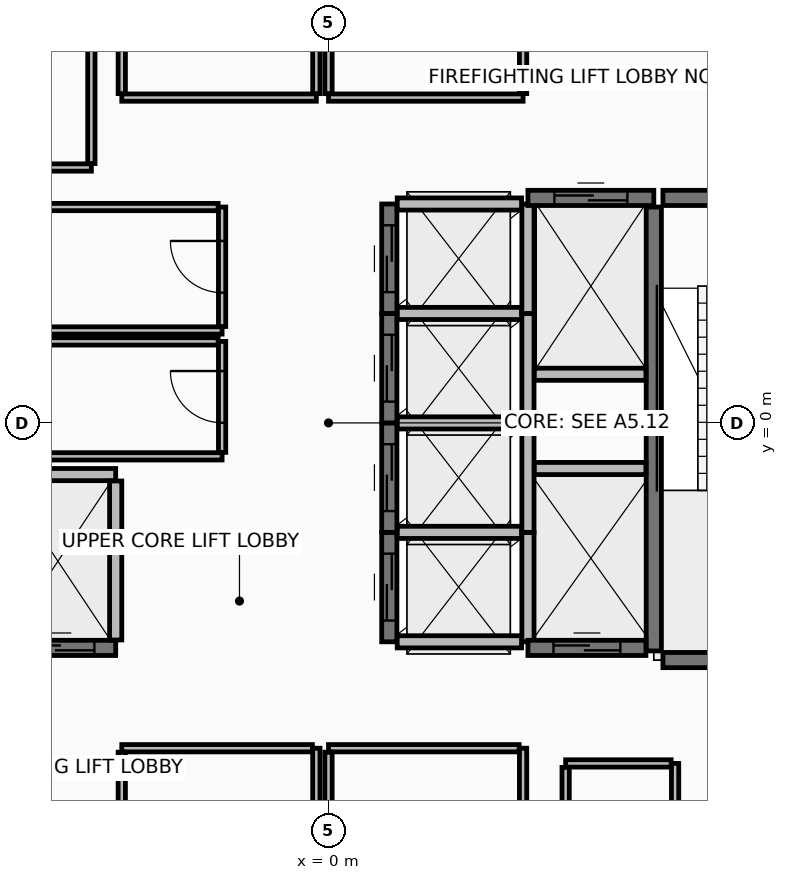
"""IFC4 building model, lengths in metres.
Left out: names, types, materials, properties, quantities, classifications, styles, units other than length and angle.
Written with IfcOpenShell. Run it as: python <this file> out.ifc"""

import sys

from ifc_helpers import new_model, si_unit, direction, frame, frame_2d, origin, place, context, subcontext, project, spatial, rectangle, extrude, element, fill, save


model = new_model("IFC4")
c1 = context("Model", 3, precision=1e-05, world=origin(), true_north=direction((0.0, 1.0)))
c2 = subcontext(c1, "Body", "Model", "MODEL_VIEW")
j1 = project(units=[si_unit("LENGTHUNIT", "METRE"), si_unit("PLANEANGLEUNIT", "RADIAN")], contexts=[c1])
p1 = place(None, origin())
s1 = spatial("IfcSite", under=j1, at=p1, CompositionType="ELEMENT")
p2 = place(p1, origin())
s2 = spatial("IfcBuilding", under=s1, at=p2, CompositionType="ELEMENT")
p3 = place(p2, frame((0.0, 0.0, 248.65)))
s3 = spatial("IfcBuildingStorey", under=s2, at=p3, CompositionType="ELEMENT", Elevation=248.65)
p4 = place(p3, frame((5.35, -3.75, 0.0), z_axis=(0.0, 0.0, 1.0), x_axis=(0.0, 1.0, 0.0)))
e1 = element("IfcWall", 1, at=p4, inside=s3, PredefinedType="SHEAR", context=c2, shape_type="SweptSolid", body=[
    extrude(rectangle(XDim=7.3, YDim=0.25, at=frame_2d((3.65, 0.0))), origin(), (0.0, 0.0, 1.0), 4.56),
])
p5 = place(p3, frame((5.5, 3.7, 0.0), z_axis=(0.0, 0.0, 1.0), x_axis=(1.0, 0.0, 0.0)))
e2 = element("IfcWall", 2, at=p5, inside=s3, PredefinedType="SHEAR", context=c2, shape_type="SweptSolid", body=[
    extrude(rectangle(XDim=3.0, YDim=0.25, at=frame_2d((1.5, 0.0))), origin(), (0.0, 0.0, 1.0), 4.56),
])
p6 = place(p5, frame((0.95, 0.0, 0.0)))
e3 = element("IfcOpeningElement", 3, at=p6, cuts=e2, PredefinedType="OPENING", context=c2, shape_type="SweptSolid", body=[
    extrude(rectangle(XDim=1.1, YDim=2.15, at=frame_2d((0.55, 1.075))), frame((0.0, 0.135, 0.0), z_axis=(0.0, -1.0, 0.0), x_axis=(1.0, 0.0, 0.0)), (0.0, 0.0, 1.0), 0.27),
])
p7 = place(p3, frame((5.5, -3.9, 0.0), z_axis=(0.0, 0.0, 1.0), x_axis=(1.0, 0.0, 0.0)))
e4 = element("IfcWall", 4, at=p7, inside=s3, PredefinedType="SHEAR", context=c2, shape_type="SweptSolid", body=[
    extrude(rectangle(XDim=3.0, YDim=0.25, at=frame_2d((1.5, 0.0))), origin(), (0.0, 0.0, 1.0), 4.56),
])
p8 = place(p3, frame((1.0, -3.6, 0.0), z_axis=(0.0, 0.0, 1.0), x_axis=(0.0, 1.0, 0.0)))
e5 = element("IfcWall", 5, at=p8, inside=s3, PredefinedType="SHEAR", context=c2, shape_type="SweptSolid", body=[
    extrude(rectangle(XDim=1.8, YDim=0.25, at=frame_2d((0.9, 0.0))), origin(), (0.0, 0.0, 1.0), 4.56),
])
p9 = place(p8, frame((0.35, 0.0, 0.0)))
e6 = element("IfcOpeningElement", 6, at=p9, cuts=e5, PredefinedType="OPENING", context=c2, shape_type="SweptSolid", body=[
    extrude(rectangle(XDim=1.1, YDim=2.2, at=frame_2d((0.55, 1.1))), frame((0.0, 0.135, 0.0), z_axis=(0.0, -1.0, 0.0), x_axis=(1.0, 0.0, 0.0)), (0.0, 0.0, 1.0), 0.27),
])
p10 = place(p3, frame((3.28, -3.6, 0.0), z_axis=(0.0, 0.0, 1.0), x_axis=(0.0, 1.0, 0.0)))
e7 = element("IfcWall", 7, at=p10, inside=s3, PredefinedType="PARTITIONING", context=c2, shape_type="SweptSolid", body=[
    extrude(rectangle(XDim=1.8, YDim=0.2, at=frame_2d((0.9, 0.0))), origin(), (0.0, 0.0, 1.0), 4.56),
])
for number, where, z_axis, x_axis in (
    (8, (1.13, -3.6, 0.0), (0.0, 0.0, 1.0), (1.0, 0.0, 0.0)),
    (9, (1.13, -1.8, 0.0), (0.0, 0.0, 1.0), (1.0, 0.0, 0.0)),
):
    element("IfcWall", number, at=place(p3, frame(where, z_axis=z_axis, x_axis=x_axis)), inside=s3, PredefinedType="PARTITIONING", context=c2, shape_type="SweptSolid", body=[
        extrude(rectangle(XDim=2.045, YDim=0.2, at=frame_2d((1.022, 0.0))), origin(), (0.0, 0.0, 1.0), 4.56),
    ])
p11 = place(p3, frame((1.0, -1.8, 0.0), z_axis=(0.0, 0.0, 1.0), x_axis=(0.0, 1.0, 0.0)))
e10 = element("IfcWall", 10, at=p11, inside=s3, PredefinedType="SHEAR", context=c2, shape_type="SweptSolid", body=[
    extrude(rectangle(XDim=1.8, YDim=0.25, at=frame_2d((0.9, 0.0))), origin(), (0.0, 0.0, 1.0), 4.56),
])
p12 = place(p11, frame((0.35, 0.0, 0.0)))
e11 = element("IfcOpeningElement", 11, at=p12, cuts=e10, PredefinedType="OPENING", context=c2, shape_type="SweptSolid", body=[
    extrude(rectangle(XDim=1.1, YDim=2.2, at=frame_2d((0.55, 1.1))), frame((0.0, 0.135, 0.0), z_axis=(0.0, -1.0, 0.0), x_axis=(1.0, 0.0, 0.0)), (0.0, 0.0, 1.0), 0.27),
])
p13 = place(p3, frame((3.28, -1.8, 0.0), z_axis=(0.0, 0.0, 1.0), x_axis=(0.0, 1.0, 0.0)))
e12 = element("IfcWall", 12, at=p13, inside=s3, PredefinedType="PARTITIONING", context=c2, shape_type="SweptSolid", body=[
    extrude(rectangle(XDim=1.8, YDim=0.2, at=frame_2d((0.9, 0.0))), origin(), (0.0, 0.0, 1.0), 4.56),
])
p14 = place(p3, frame((1.13, 0.0, 0.0), z_axis=(0.0, 0.0, 1.0), x_axis=(1.0, 0.0, 0.0)))
e13 = element("IfcWall", 13, at=p14, inside=s3, PredefinedType="PARTITIONING", context=c2, shape_type="SweptSolid", body=[
    extrude(rectangle(XDim=2.045, YDim=0.2, at=frame_2d((1.022, 0.0))), origin(), (0.0, 0.0, 1.0), 4.56),
])
p15 = place(p3, frame((1.0, 0.0, 0.0), z_axis=(0.0, 0.0, 1.0), x_axis=(0.0, 1.0, 0.0)))
e14 = element("IfcWall", 14, at=p15, inside=s3, PredefinedType="SHEAR", context=c2, shape_type="SweptSolid", body=[
    extrude(rectangle(XDim=1.8, YDim=0.25, at=frame_2d((0.9, 0.0))), origin(), (0.0, 0.0, 1.0), 4.56),
])
p16 = place(p15, frame((0.35, 0.0, 0.0)))
e15 = element("IfcOpeningElement", 15, at=p16, cuts=e14, PredefinedType="OPENING", context=c2, shape_type="SweptSolid", body=[
    extrude(rectangle(XDim=1.1, YDim=2.2, at=frame_2d((0.55, 1.1))), frame((0.0, 0.135, 0.0), z_axis=(0.0, -1.0, 0.0), x_axis=(1.0, 0.0, 0.0)), (0.0, 0.0, 1.0), 0.27),
])
p17 = place(p3, frame((3.28, 0.0, 0.0), z_axis=(0.0, 0.0, 1.0), x_axis=(0.0, 1.0, 0.0)))
e16 = element("IfcWall", 16, at=p17, inside=s3, PredefinedType="PARTITIONING", context=c2, shape_type="SweptSolid", body=[
    extrude(rectangle(XDim=1.8, YDim=0.2, at=frame_2d((0.9, 0.0))), origin(), (0.0, 0.0, 1.0), 4.56),
])
p18 = place(p3, frame((1.13, 1.8, 0.0), z_axis=(0.0, 0.0, 1.0), x_axis=(1.0, 0.0, 0.0)))
e17 = element("IfcWall", 17, at=p18, inside=s3, PredefinedType="PARTITIONING", context=c2, shape_type="SweptSolid", body=[
    extrude(rectangle(XDim=2.045, YDim=0.2, at=frame_2d((1.022, 0.0))), origin(), (0.0, 0.0, 1.0), 4.56),
])
p19 = place(p3, frame((1.0, 1.8, 0.0), z_axis=(0.0, 0.0, 1.0), x_axis=(0.0, 1.0, 0.0)))
e18 = element("IfcWall", 18, at=p19, inside=s3, PredefinedType="SHEAR", context=c2, shape_type="SweptSolid", body=[
    extrude(rectangle(XDim=1.8, YDim=0.25, at=frame_2d((0.9, 0.0))), origin(), (0.0, 0.0, 1.0), 4.56),
])
p20 = place(p19, frame((0.35, 0.0, 0.0)))
e19 = element("IfcOpeningElement", 19, at=p20, cuts=e18, PredefinedType="OPENING", context=c2, shape_type="SweptSolid", body=[
    extrude(rectangle(XDim=1.1, YDim=2.2, at=frame_2d((0.55, 1.1))), frame((0.0, 0.135, 0.0), z_axis=(0.0, -1.0, 0.0), x_axis=(1.0, 0.0, 0.0)), (0.0, 0.0, 1.0), 0.27),
])
p21 = place(p3, frame((3.28, 1.8, 0.0), z_axis=(0.0, 0.0, 1.0), x_axis=(0.0, 1.0, 0.0)))
e20 = element("IfcWall", 20, at=p21, inside=s3, PredefinedType="PARTITIONING", context=c2, shape_type="SweptSolid", body=[
    extrude(rectangle(XDim=1.8, YDim=0.2, at=frame_2d((0.9, 0.0))), origin(), (0.0, 0.0, 1.0), 4.56),
])
p22 = place(p3, frame((1.13, 3.6, 0.0), z_axis=(0.0, 0.0, 1.0), x_axis=(1.0, 0.0, 0.0)))
e21 = element("IfcWall", 21, at=p22, inside=s3, PredefinedType="PARTITIONING", context=c2, shape_type="SweptSolid", body=[
    extrude(rectangle(XDim=2.045, YDim=0.2, at=frame_2d((1.022, 0.0))), origin(), (0.0, 0.0, 1.0), 3.855),
])
p23 = place(p3, frame((-5.4, -3.7, 0.0), z_axis=(0.0, 0.0, 1.0), x_axis=(1.0, 0.0, 0.0)))
e22 = element("IfcWall", 22, at=p23, inside=s3, PredefinedType="SHEAR", context=c2, shape_type="SweptSolid", body=[
    extrude(rectangle(XDim=1.9, YDim=0.25, at=frame_2d((0.95, 0.0))), origin(), (0.0, 0.0, 1.0), 4.56),
])
p24 = place(p23, frame((0.35, 0.0, 0.0)))
e23 = element("IfcOpeningElement", 23, at=p24, cuts=e22, PredefinedType="OPENING", context=c2, shape_type="SweptSolid", body=[
    extrude(rectangle(XDim=1.2, YDim=2.2, at=frame_2d((0.6, 1.1))), frame((0.0, 0.135, 0.0), z_axis=(0.0, -1.0, 0.0), x_axis=(1.0, 0.0, 0.0)), (0.0, 0.0, 1.0), 0.27),
])
p25 = place(p3, frame((-5.27, -0.85, 0.0), z_axis=(0.0, 0.0, 1.0), x_axis=(1.0, 0.0, 0.0)))
e24 = element("IfcWall", 24, at=p25, inside=s3, PredefinedType="PARTITIONING", context=c2, shape_type="SweptSolid", body=[
    extrude(rectangle(XDim=1.77, YDim=0.2, at=frame_2d((0.885, 0.0))), origin(), (0.0, 0.0, 1.0), 4.56),
])
p26 = place(p3, frame((-3.5, -3.57, 0.0), z_axis=(0.0, 0.0, 1.0), x_axis=(0.0, 1.0, 0.0)))
e25 = element("IfcWall", 25, at=p26, inside=s3, PredefinedType="PARTITIONING", context=c2, shape_type="SweptSolid", body=[
    extrude(rectangle(XDim=2.615, YDim=0.2, at=frame_2d((1.308, 0.0))), origin(), (0.0, 0.0, 1.0), 4.56),
])
p27 = place(p3, frame((3.28, 3.7, 0.0), z_axis=(0.0, 0.0, 1.0), x_axis=(1.0, 0.0, 0.0)))
e26 = element("IfcWall", 26, at=p27, inside=s3, PredefinedType="SHEAR", context=c2, shape_type="SweptSolid", body=[
    extrude(rectangle(XDim=2.07, YDim=0.25, at=frame_2d((1.035, 0.0))), origin(), (0.0, 0.0, 1.0), 4.56),
])
p28 = place(p27, frame((0.435, 0.0, 0.0)))
e27 = element("IfcOpeningElement", 27, at=p28, cuts=e26, PredefinedType="OPENING", context=c2, shape_type="SweptSolid", body=[
    extrude(rectangle(XDim=1.2, YDim=2.2, at=frame_2d((0.6, 1.1))), frame((0.0, 0.135, 0.0), z_axis=(0.0, -1.0, 0.0), x_axis=(1.0, 0.0, 0.0)), (0.0, 0.0, 1.0), 0.27),
])
p29 = place(p3, frame((3.385, 0.8, 0.0), z_axis=(0.0, 0.0, 1.0), x_axis=(1.0, 0.0, 0.0)))
e28 = element("IfcWall", 28, at=p29, inside=s3, PredefinedType="PARTITIONING", context=c2, shape_type="SweptSolid", body=[
    extrude(rectangle(XDim=1.835, YDim=0.2, at=frame_2d((0.917, 0.0))), origin(), (0.0, 0.0, 1.0), 4.56),
])
p30 = place(p3, frame((3.28, -3.7, 0.0), z_axis=(0.0, 0.0, 1.0), x_axis=(1.0, 0.0, 0.0)))
e29 = element("IfcWall", 29, at=p30, inside=s3, PredefinedType="SHEAR", context=c2, shape_type="SweptSolid", body=[
    extrude(rectangle(XDim=1.94, YDim=0.25, at=frame_2d((0.97, 0.0))), origin(), (0.0, 0.0, 1.0), 4.56),
])
p31 = place(p30, frame((0.42, 0.0, 0.0)))
e30 = element("IfcOpeningElement", 30, at=p31, cuts=e29, PredefinedType="OPENING", context=c2, shape_type="SweptSolid", body=[
    extrude(rectangle(XDim=1.1, YDim=2.2, at=frame_2d((0.55, 1.1))), frame((0.0, 0.135, 0.0), z_axis=(0.0, -1.0, 0.0), x_axis=(1.0, 0.0, 0.0)), (0.0, 0.0, 1.0), 0.27),
])
p32 = place(p3, frame((3.385, -0.75, 0.0), z_axis=(0.0, 0.0, 1.0), x_axis=(1.0, 0.0, 0.0)))
e31 = element("IfcWall", 31, at=p32, inside=s3, PredefinedType="PARTITIONING", context=c2, shape_type="SweptSolid", body=[
    extrude(rectangle(XDim=1.835, YDim=0.2, at=frame_2d((0.917, 0.0))), origin(), (0.0, 0.0, 1.0), 4.56),
])
p33 = place(p3, frame((-5.22, 1.52, 0.0), z_axis=(0.0, 0.0, 1.0), x_axis=(1.0, 0.0, 0.0)))
e32 = element("IfcWall", 32, at=p33, inside=s3, PredefinedType="PARTITIONING", context=c2, shape_type="SweptSolid", body=[
    extrude(rectangle(XDim=3.47, YDim=0.12, at=frame_2d((1.735, 0.0))), origin(), (0.0, 0.0, 1.0), 4.56),
])
p34 = place(p3, frame((-1.75, 1.585, 0.0), z_axis=(0.0, 0.0, 1.0), x_axis=(0.0, 1.0, 0.0)))
e33 = element("IfcWall", 33, at=p34, inside=s3, PredefinedType="PARTITIONING", context=c2, shape_type="SweptSolid", body=[
    extrude(rectangle(XDim=1.965, YDim=0.12, at=frame_2d((0.982, 0.0))), origin(), (0.0, 0.0, 1.0), 4.56),
])
p35 = place(p34, frame((0.557, 0.0, 0.0)))
e34 = element("IfcOpeningElement", 34, at=p35, cuts=e33, PredefinedType="OPENING", context=c2, shape_type="SweptSolid", body=[
    extrude(rectangle(XDim=0.85, YDim=2.1, at=frame_2d((0.425, 1.05))), frame((0.0, 0.07, 0.0), z_axis=(0.0, -1.0, 0.0), x_axis=(1.0, 0.0, 0.0)), (0.0, 0.0, 1.0), 0.14),
])
p36 = place(p3, frame((-1.815, 3.55, 0.0), z_axis=(0.0, 0.0, 1.0), x_axis=(-1.0, 0.0, 0.0)))
e35 = element("IfcWall", 35, at=p36, inside=s3, PredefinedType="PARTITIONING", context=c2, shape_type="SweptSolid", body=[
    extrude(rectangle(XDim=3.405, YDim=0.12, at=frame_2d((1.703, 0.0))), origin(), (0.0, 0.0, 1.0), 4.56),
])
p37 = place(p3, frame((-5.22, -0.55, 0.0), z_axis=(0.0, 0.0, 1.0), x_axis=(1.0, 0.0, 0.0)))
e36 = element("IfcWall", 36, at=p37, inside=s3, PredefinedType="PARTITIONING", context=c2, shape_type="SweptSolid", body=[
    extrude(rectangle(XDim=3.47, YDim=0.12, at=frame_2d((1.735, 0.0))), origin(), (0.0, 0.0, 1.0), 4.56),
])
p38 = place(p3, frame((-1.75, -0.485, 0.0), z_axis=(0.0, 0.0, 1.0), x_axis=(0.0, 1.0, 0.0)))
e37 = element("IfcWall", 37, at=p38, inside=s3, PredefinedType="PARTITIONING", context=c2, shape_type="SweptSolid", body=[
    extrude(rectangle(XDim=1.825, YDim=0.12, at=frame_2d((0.913, 0.0))), origin(), (0.0, 0.0, 1.0), 4.56),
])
p39 = place(p38, frame((0.488, 0.0, 0.0)))
e38 = element("IfcOpeningElement", 38, at=p39, cuts=e37, PredefinedType="OPENING", context=c2, shape_type="SweptSolid", body=[
    extrude(rectangle(XDim=0.85, YDim=2.1, at=frame_2d((0.425, 1.05))), frame((0.0, 0.07, 0.0), z_axis=(0.0, -1.0, 0.0), x_axis=(1.0, 0.0, 0.0)), (0.0, 0.0, 1.0), 0.14),
])
p40 = place(p3, frame((-1.815, 1.34, 0.0), z_axis=(0.0, 0.0, 1.0), x_axis=(-1.0, 0.0, 0.0)))
e39 = element("IfcWall", 39, at=p40, inside=s3, PredefinedType="PARTITIONING", context=c2, shape_type="SweptSolid", body=[
    extrude(rectangle(XDim=3.405, YDim=0.12, at=frame_2d((1.703, 0.0))), origin(), (0.0, 0.0, 1.0), 4.56),
])
p41 = place(p3, frame((-0.2, -7.42, 0.0), z_axis=(0.0, 0.0, 1.0), x_axis=(0.0, 1.0, 0.0)))
e40 = element("IfcWall", 40, at=p41, inside=s3, PredefinedType="PARTITIONING", context=c2, shape_type="SweptSolid", body=[
    extrude(rectangle(XDim=2.07, YDim=0.12, at=frame_2d((1.035, 0.0))), origin(), (0.0, 0.0, 1.0), 3.855),
])
p42 = place(p3, frame((-0.265, -5.35, 0.0), z_axis=(0.0, 0.0, 1.0), x_axis=(-1.0, 0.0, 0.0)))
e41 = element("IfcWall", 41, at=p42, inside=s3, PredefinedType="PARTITIONING", context=c2, shape_type="SweptSolid", body=[
    extrude(rectangle(XDim=3.135, YDim=0.12, at=frame_2d((1.567, 0.0))), origin(), (0.0, 0.0, 1.0), 3.855),
])
p43 = place(p3, frame((-3.4, -5.415, 0.0), z_axis=(0.0, 0.0, 1.0), x_axis=(0.0, -1.0, 0.0)))
e42 = element("IfcWall", 42, at=p43, inside=s3, PredefinedType="PARTITIONING", context=c2, shape_type="SweptSolid", body=[
    extrude(rectangle(XDim=2.8, YDim=0.12, at=frame_2d((1.4, 0.0))), origin(), (0.0, 0.0, 1.0), 2.355),
])
p44 = place(p3, frame((3.2, -8.215, 0.0), z_axis=(0.0, 0.0, 1.0), x_axis=(0.0, 1.0, 0.0)))
e43 = element("IfcWall", 43, at=p44, inside=s3, PredefinedType="PARTITIONING", context=c2, shape_type="SweptSolid", body=[
    extrude(rectangle(XDim=2.865, YDim=0.12, at=frame_2d((1.433, 0.0))), origin(), (0.0, 0.0, 1.0), 3.855),
])
p45 = place(p3, frame((3.135, -5.35, 0.0), z_axis=(0.0, 0.0, 1.0), x_axis=(-1.0, 0.0, 0.0)))
e44 = element("IfcWall", 44, at=p45, inside=s3, PredefinedType="PARTITIONING", context=c2, shape_type="SweptSolid", body=[
    extrude(rectangle(XDim=3.135, YDim=0.12, at=frame_2d((1.567, 0.0))), origin(), (0.0, 0.0, 1.0), 4.56),
])
p46 = place(p3, frame((0.0, -5.415, 0.0), z_axis=(0.0, 0.0, 1.0), x_axis=(0.0, -1.0, 0.0)))
e45 = element("IfcWall", 45, at=p46, inside=s3, PredefinedType="PARTITIONING", context=c2, shape_type="SweptSolid", body=[
    extrude(rectangle(XDim=2.005, YDim=0.12, at=frame_2d((1.002, 0.0))), origin(), (0.0, 0.0, 1.0), 3.855),
])
p47 = place(p3, frame((-3.4, 5.35, 0.0), z_axis=(0.0, 0.0, 1.0), x_axis=(1.0, 0.0, 0.0)))
e46 = element("IfcWall", 46, at=p47, inside=s3, PredefinedType="PARTITIONING", context=c2, shape_type="SweptSolid", body=[
    extrude(rectangle(XDim=3.2, YDim=0.12, at=frame_2d((1.6, 0.0))), origin(), (0.0, 0.0, 1.0), 4.56),
])
p48 = place(p3, frame((-0.2, 5.415, 0.0), z_axis=(0.0, 0.0, 1.0), x_axis=(0.0, 1.0, 0.0)))
e47 = element("IfcWall", 47, at=p48, inside=s3, PredefinedType="PARTITIONING", context=c2, shape_type="SweptSolid", body=[
    extrude(rectangle(XDim=2.005, YDim=0.12, at=frame_2d((1.002, 0.0))), origin(), (0.0, 0.0, 1.0), 3.855),
])
p49 = place(p3, frame((-3.4, 8.215, 0.0), z_axis=(0.0, 0.0, 1.0), x_axis=(0.0, -1.0, 0.0)))
e48 = element("IfcWall", 48, at=p49, inside=s3, PredefinedType="PARTITIONING", context=c2, shape_type="SweptSolid", body=[
    extrude(rectangle(XDim=2.8, YDim=0.12, at=frame_2d((1.4, 0.0))), origin(), (0.0, 0.0, 1.0), 3.855),
])
p50 = place(p3, frame((0.0, 5.35, 0.0), z_axis=(0.0, 0.0, 1.0), x_axis=(1.0, 0.0, 0.0)))
e49 = element("IfcWall", 49, at=p50, inside=s3, PredefinedType="PARTITIONING", context=c2, shape_type="SweptSolid", body=[
    extrude(rectangle(XDim=3.2, YDim=0.12, at=frame_2d((1.6, 0.0))), origin(), (0.0, 0.0, 1.0), 3.855),
])
p51 = place(p3, frame((3.2, 5.415, 0.0), z_axis=(0.0, 0.0, 1.0), x_axis=(0.0, 1.0, 0.0)))
e50 = element("IfcWall", 50, at=p51, inside=s3, PredefinedType="PARTITIONING", context=c2, shape_type="SweptSolid", body=[
    extrude(rectangle(XDim=2.8, YDim=0.12, at=frame_2d((1.4, 0.0))), origin(), (0.0, 0.0, 1.0), 3.855),
])
p52 = place(p3, frame((0.0, 7.42, 0.0), z_axis=(0.0, 0.0, 1.0), x_axis=(0.0, -1.0, 0.0)))
e51 = element("IfcWall", 51, at=p52, inside=s3, PredefinedType="PARTITIONING", context=c2, shape_type="SweptSolid", body=[
    extrude(rectangle(XDim=2.005, YDim=0.12, at=frame_2d((1.002, 0.0))), origin(), (0.0, 0.0, 1.0), 3.855),
])
p53 = place(p3, frame((-6.35, 4.2, 0.0), z_axis=(0.0, 0.0, 1.0), x_axis=(1.0, 0.0, 0.0)))
e52 = element("IfcWall", 52, at=p53, inside=s3, PredefinedType="PARTITIONING", context=c2, shape_type="SweptSolid", body=[
    extrude(rectangle(XDim=2.45, YDim=0.12, at=frame_2d((1.225, 0.0))), origin(), (0.0, 0.0, 1.0), 4.56),
])
p54 = place(p3, frame((-3.9, 4.265, 0.0), z_axis=(0.0, 0.0, 1.0), x_axis=(0.0, 1.0, 0.0)))
e53 = element("IfcWall", 53, at=p54, inside=s3, PredefinedType="PARTITIONING", context=c2, shape_type="SweptSolid", body=[
    extrude(rectangle(XDim=3.95, YDim=0.12, at=frame_2d((1.975, 0.0))), origin(), (0.0, 0.0, 1.0), 3.855),
])
p55 = place(p3, frame((5.7, -8.215, 0.0), z_axis=(0.0, 0.0, 1.0), x_axis=(0.0, 1.0, 0.0)))
e54 = element("IfcWall", 54, at=p55, inside=s3, PredefinedType="PARTITIONING", context=c2, shape_type="SweptSolid", body=[
    extrude(rectangle(XDim=2.615, YDim=0.12, at=frame_2d((1.308, 0.0))), origin(), (0.0, 0.0, 1.0), 3.855),
])
p56 = place(p3, frame((5.635, -5.6, 0.0), z_axis=(0.0, 0.0, 1.0), x_axis=(-1.0, 0.0, 0.0)))
e55 = element("IfcWall", 55, at=p56, inside=s3, PredefinedType="PARTITIONING", context=c2, shape_type="SweptSolid", body=[
    extrude(rectangle(XDim=1.735, YDim=0.12, at=frame_2d((0.868, 0.0))), origin(), (0.0, 0.0, 1.0), 4.56),
])
p57 = place(p3, frame((3.9, -5.665, 0.0), z_axis=(0.0, 0.0, 1.0), x_axis=(0.0, -1.0, 0.0)))
e56 = element("IfcWall", 56, at=p57, inside=s3, PredefinedType="PARTITIONING", context=c2, shape_type="SweptSolid", body=[
    extrude(rectangle(XDim=2.55, YDim=0.12, at=frame_2d((1.275, 0.0))), origin(), (0.0, 0.0, 1.0), 3.855),
])
p58 = place(p9, origin())
e57 = element("IfcDoor", 57, at=p58, inside=s3, OperationType="SLIDING_TO_LEFT", PredefinedType="DOOR", context=c2, shape_type="SweptSolid", body=[
    extrude(rectangle(XDim=1.1, YDim=2.2, at=frame_2d((0.55, 1.1))), frame((0.0, 0.025, 0.0), z_axis=(0.0, -1.0, 0.0), x_axis=(1.0, 0.0, 0.0)), (0.0, 0.0, 1.0), 0.05),
])
fill(e6, e57)
p59 = place(p12, origin())
e58 = element("IfcDoor", 58, at=p59, inside=s3, OperationType="SLIDING_TO_LEFT", PredefinedType="DOOR", context=c2, shape_type="SweptSolid", body=[
    extrude(rectangle(XDim=1.1, YDim=2.2, at=frame_2d((0.55, 1.1))), frame((0.0, 0.025, 0.0), z_axis=(0.0, -1.0, 0.0), x_axis=(1.0, 0.0, 0.0)), (0.0, 0.0, 1.0), 0.05),
])
fill(e11, e58)
p60 = place(p16, origin())
e59 = element("IfcDoor", 59, at=p60, inside=s3, OperationType="SLIDING_TO_LEFT", PredefinedType="DOOR", context=c2, shape_type="SweptSolid", body=[
    extrude(rectangle(XDim=1.1, YDim=2.2, at=frame_2d((0.55, 1.1))), frame((0.0, 0.025, 0.0), z_axis=(0.0, -1.0, 0.0), x_axis=(1.0, 0.0, 0.0)), (0.0, 0.0, 1.0), 0.05),
])
fill(e15, e59)
p61 = place(p20, origin())
e60 = element("IfcDoor", 60, at=p61, inside=s3, OperationType="SLIDING_TO_LEFT", PredefinedType="DOOR", context=c2, shape_type="SweptSolid", body=[
    extrude(rectangle(XDim=1.1, YDim=2.2, at=frame_2d((0.55, 1.1))), frame((0.0, 0.025, 0.0), z_axis=(0.0, -1.0, 0.0), x_axis=(1.0, 0.0, 0.0)), (0.0, 0.0, 1.0), 0.05),
])
fill(e19, e60)
p62 = place(p24, origin())
e61 = element("IfcDoor", 61, at=p62, inside=s3, OperationType="SLIDING_TO_RIGHT", PredefinedType="DOOR", context=c2, shape_type="SweptSolid", body=[
    extrude(rectangle(XDim=1.2, YDim=2.2, at=frame_2d((0.6, 1.1))), frame((0.0, 0.025, 0.0), z_axis=(0.0, -1.0, 0.0), x_axis=(1.0, 0.0, 0.0)), (0.0, 0.0, 1.0), 0.05),
])
fill(e23, e61)
p63 = place(p28, origin())
e62 = element("IfcDoor", 62, at=p63, inside=s3, OperationType="SLIDING_TO_RIGHT", PredefinedType="DOOR", context=c2, shape_type="SweptSolid", body=[
    extrude(rectangle(XDim=1.2, YDim=2.2, at=frame_2d((0.6, 1.1))), frame((0.0, 0.025, 0.0), z_axis=(0.0, -1.0, 0.0), x_axis=(1.0, 0.0, 0.0)), (0.0, 0.0, 1.0), 0.05),
])
fill(e27, e62)
p64 = place(p31, origin())
e63 = element("IfcDoor", 63, at=p64, inside=s3, OperationType="SLIDING_TO_LEFT", PredefinedType="DOOR", context=c2, shape_type="SweptSolid", body=[
    extrude(rectangle(XDim=1.1, YDim=2.2, at=frame_2d((0.55, 1.1))), frame((0.0, 0.025, 0.0), z_axis=(0.0, -1.0, 0.0), x_axis=(1.0, 0.0, 0.0)), (0.0, 0.0, 1.0), 0.05),
])
fill(e30, e63)
p65 = place(p35, frame((0.85, 0.0, 0.0), z_axis=(0.0, 0.0, 1.0), x_axis=(-1.0, 0.0, 0.0)))
e64 = element("IfcDoor", 64, at=p65, inside=s3, OperationType="SINGLE_SWING_RIGHT", PredefinedType="DOOR", context=c2, shape_type="SweptSolid", body=[
    extrude(rectangle(XDim=0.85, YDim=2.1, at=frame_2d((0.425, 1.05))), frame((0.0, 0.025, 0.0), z_axis=(0.0, -1.0, 0.0), x_axis=(1.0, 0.0, 0.0)), (0.0, 0.0, 1.0), 0.05),
])
fill(e34, e64)
p66 = place(p39, frame((0.85, 0.0, 0.0), z_axis=(0.0, 0.0, 1.0), x_axis=(-1.0, 0.0, 0.0)))
e65 = element("IfcDoor", 65, at=p66, inside=s3, OperationType="SINGLE_SWING_RIGHT", PredefinedType="DOOR", context=c2, shape_type="SweptSolid", body=[
    extrude(rectangle(XDim=0.85, YDim=2.1, at=frame_2d((0.425, 1.05))), frame((0.0, 0.025, 0.0), z_axis=(0.0, -1.0, 0.0), x_axis=(1.0, 0.0, 0.0)), (0.0, 0.0, 1.0), 0.05),
])
fill(e38, e65)
save(model, sys.argv[1])
